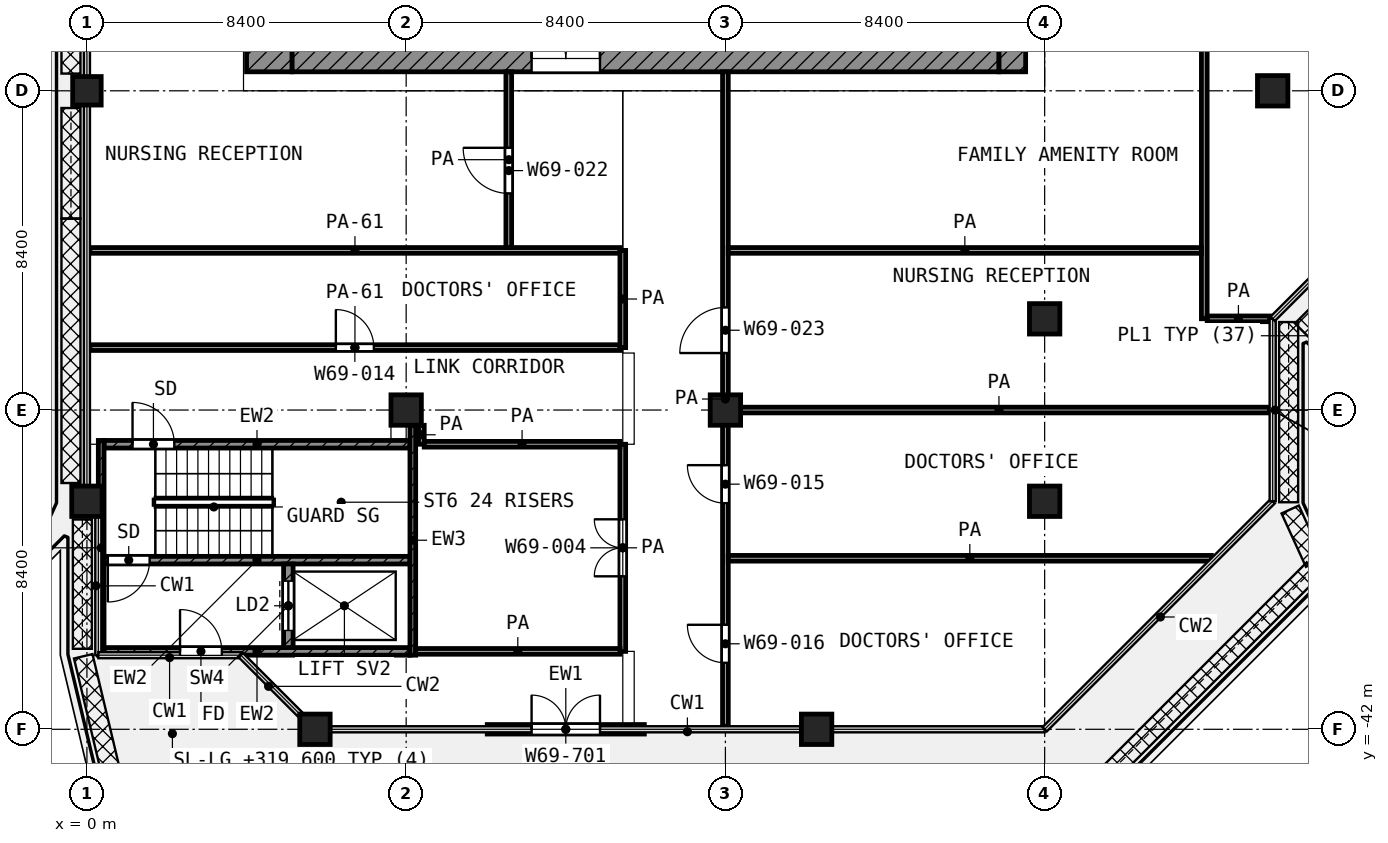
"""IFC4 building model, lengths in metres.
Left out: names, types, materials, properties, quantities, classifications, styles, units other than length and angle.
Written with IfcOpenShell. Run it as: python <this file> out.ifc"""

import sys

from ifc_helpers import new_model, si_unit, direction, frame, frame_2d, origin, origin_2d, place, context, subcontext, project, spatial, rectangle, extrude, element, fill, save


model = new_model("IFC4")
c1 = context("Model", 3, precision=1e-05, world=origin(), true_north=direction((0.0, 1.0)))
c2 = subcontext(c1, "Body", "Model", "MODEL_VIEW")
j1 = project(units=[si_unit("LENGTHUNIT", "METRE"), si_unit("PLANEANGLEUNIT", "RADIAN")], contexts=[c1])
p1 = place(None, origin())
s1 = spatial("IfcSite", under=j1, at=p1, CompositionType="ELEMENT")
p2 = place(p1, origin())
s2 = spatial("IfcBuilding", under=s1, at=p2, CompositionType="ELEMENT")
p3 = place(p2, frame((0.0, 0.0, 319.6)))
s3 = spatial("IfcBuildingStorey", under=s2, at=p3, CompositionType="ELEMENT", Elevation=319.6)
p4 = place(p3, frame((0.0, -25.2, 0.0), z_axis=(0.0, 0.0, 1.0), x_axis=(1.0, 0.0, 0.0)))
e1 = element("IfcColumn", 1, at=p4, inside=s3, PredefinedType="COLUMN", context=c2, shape_type="SweptSolid", body=[
    extrude(rectangle(XDim=0.75, YDim=0.75, at=origin_2d()), origin(), (0.0, 0.0, 1.0), 4.2),
])
for number, where, z_axis, x_axis in (
    (2, (31.2, -25.2, 0.0), (0.0, 0.0, 1.0), (1.0, 0.0, 0.0)),
    (3, (25.2, -31.2, 0.0), (0.0, 0.0, 1.0), (1.0, 0.0, 0.0)),
    (4, (8.4, -33.6, 0.0), (0.0, 0.0, 1.0), (1.0, 0.0, 0.0)),
    (5, (16.8, -33.6, 0.0), (0.0, 0.0, 1.0), (1.0, 0.0, 0.0)),
    (6, (0.0, -36.0, 0.0), (0.0, 0.0, 1.0), (1.0, 0.0, 0.0)),
    (7, (25.2, -36.0, 0.0), (0.0, 0.0, 1.0), (1.0, 0.0, 0.0)),
    (8, (6.0, -42.0, 0.0), (0.0, 0.0, 1.0), (1.0, 0.0, 0.0)),
    (9, (19.2, -42.0, 0.0), (0.0, 0.0, 1.0), (1.0, 0.0, 0.0)),
):
    element("IfcColumn", number, at=place(p3, frame(where, z_axis=z_axis, x_axis=x_axis)), inside=s3, PredefinedType="COLUMN", context=c2, shape_type="SweptSolid", body=[
        extrude(rectangle(XDim=0.8, YDim=0.8, at=origin_2d()), origin(), (0.0, 0.0, 1.0), 4.2),
    ])
p5 = place(p3, frame((10.533, -42.0, 0.0), z_axis=(0.0, 0.0, 1.0), x_axis=(1.0, 0.0, 0.0)))
e10 = element("IfcWall", 10, at=p5, inside=s3, PredefinedType="SOLIDWALL", context=c2, shape_type="SweptSolid", body=[
    extrude(rectangle(XDim=4.133, YDim=0.25, at=frame_2d((2.067, 0.0))), origin(), (0.0, 0.0, 1.0), 3.48),
])
p6 = place(p5, frame((1.167, 0.0, 0.0)))
e11 = element("IfcOpeningElement", 11, at=p6, cuts=e10, PredefinedType="OPENING", context=c2, shape_type="SweptSolid", body=[
    extrude(rectangle(XDim=1.8, YDim=2.1, at=frame_2d((0.9, 1.05))), frame((0.0, 0.135, 0.0), z_axis=(0.0, -1.0, 0.0), x_axis=(1.0, 0.0, 0.0)), (0.0, 0.0, 1.0), 0.27),
])
p7 = place(p3, frame((4.8, -24.7, 0.0), z_axis=(0.0, 0.0, 1.0), x_axis=(0.0, 1.0, 0.0)))
e12 = element("IfcWall", 12, at=p7, inside=s3, PredefinedType="SHEAR", context=c2, shape_type="SweptSolid", body=[
    extrude(rectangle(XDim=19.3, YDim=1.2, at=frame_2d((9.65, 0.0))), origin(), (0.0, 0.0, 1.0), 3.6),
])
p8 = place(p7, frame((11.15, 0.0, 0.0)))
e13 = element("IfcOpeningElement", 13, at=p8, cuts=e12, PredefinedType="OPENING", context=c2, shape_type="SweptSolid", body=[
    extrude(rectangle(XDim=1.1, YDim=2.1, at=frame_2d((0.55, 1.05))), frame((0.0, 0.61, 0.0), z_axis=(0.0, -1.0, 0.0), x_axis=(1.0, 0.0, 0.0)), (0.0, 0.0, 1.0), 1.22),
])
p9 = place(p7, frame((1.85, 0.0, 0.0)))
e14 = element("IfcOpeningElement", 14, at=p9, cuts=e12, PredefinedType="OPENING", context=c2, shape_type="SweptSolid", body=[
    extrude(rectangle(XDim=1.1, YDim=2.1, at=frame_2d((0.55, 1.05))), frame((0.0, 0.61, 0.0), z_axis=(0.0, -1.0, 0.0), x_axis=(1.0, 0.0, 0.0)), (0.0, 0.0, 1.0), 1.22),
])
p10 = place(p3, frame((5.4, -24.35, 0.0), z_axis=(0.0, 0.0, 1.0), x_axis=(1.0, 0.0, 0.0)))
e15 = element("IfcWall", 15, at=p10, inside=s3, PredefinedType="SHEAR", context=c2, shape_type="SweptSolid", body=[
    extrude(rectangle(XDim=18.6, YDim=0.7, at=frame_2d((9.3, 0.0))), origin(), (0.0, 0.0, 1.0), 3.6),
])
p11 = place(p10, frame((6.3, 0.0, 0.0)))
e16 = element("IfcOpeningElement", 16, at=p11, cuts=e15, PredefinedType="OPENING", context=c2, shape_type="SweptSolid", body=[
    extrude(rectangle(XDim=1.8, YDim=2.1, at=frame_2d((0.9, 1.05))), frame((0.0, 0.36, 0.0), z_axis=(0.0, -1.0, 0.0), x_axis=(1.0, 0.0, 0.0)), (0.0, 0.0, 1.0), 0.72),
])
p12 = place(p3, frame((24.35, -24.7, 0.0), z_axis=(0.0, 0.0, 1.0), x_axis=(0.0, 1.0, 0.0)))
e17 = element("IfcWall", 17, at=p12, inside=s3, PredefinedType="SHEAR", context=c2, shape_type="SweptSolid", body=[
    extrude(rectangle(XDim=0.7, YDim=0.7, at=frame_2d((0.35, 0.0))), origin(), (0.0, 0.0, 1.0), 3.6),
])
p13 = place(p3, frame((0.375, -40.05, 0.0), z_axis=(0.0, 0.0, 1.0), x_axis=(0.0, 1.0, 0.0)))
e18 = element("IfcWall", 18, at=p13, inside=s3, PredefinedType="SHEAR", context=c2, shape_type="SweptSolid", body=[
    extrude(rectangle(XDim=5.65, YDim=0.15, at=frame_2d((2.825, 0.0))), origin(), (0.0, 0.0, 1.0), 3.6),
])
p14 = place(p3, frame((8.575, -40.05, 0.0), z_axis=(0.0, 0.0, 1.0), x_axis=(0.0, 1.0, 0.0)))
e19 = element("IfcWall", 19, at=p14, inside=s3, PredefinedType="SHEAR", context=c2, shape_type="SweptSolid", body=[
    extrude(rectangle(XDim=6.05, YDim=0.15, at=frame_2d((3.025, 0.0))), origin(), (0.0, 0.0, 1.0), 3.6),
])
p15 = place(p3, frame((0.45, -34.5, 0.0), z_axis=(0.0, 0.0, 1.0), x_axis=(1.0, 0.0, 0.0)))
e20 = element("IfcWall", 20, at=p15, inside=s3, PredefinedType="SHEAR", context=c2, shape_type="SweptSolid", body=[
    extrude(rectangle(XDim=8.05, YDim=0.2, at=frame_2d((4.025, 0.0))), origin(), (0.0, 0.0, 1.0), 3.6),
])
p16 = place(p15, frame((0.75, 0.0, 0.0)))
e21 = element("IfcOpeningElement", 21, at=p16, cuts=e20, PredefinedType="OPENING", context=c2, shape_type="SweptSolid", body=[
    extrude(rectangle(XDim=1.1, YDim=2.1, at=frame_2d((0.55, 1.05))), frame((0.0, 0.11, 0.0), z_axis=(0.0, -1.0, 0.0), x_axis=(1.0, 0.0, 0.0)), (0.0, 0.0, 1.0), 0.22),
])
p17 = place(p3, frame((0.45, -37.55, 0.0), z_axis=(0.0, 0.0, 1.0), x_axis=(1.0, 0.0, 0.0)))
e22 = element("IfcWall", 22, at=p17, inside=s3, PredefinedType="SHEAR", context=c2, shape_type="SweptSolid", body=[
    extrude(rectangle(XDim=8.05, YDim=0.2, at=frame_2d((4.025, 0.0))), origin(), (0.0, 0.0, 1.0), 3.6),
])
p18 = place(p17, frame((0.1, 0.0, 0.0)))
e23 = element("IfcOpeningElement", 23, at=p18, cuts=e22, PredefinedType="OPENING", context=c2, shape_type="SweptSolid", body=[
    extrude(rectangle(XDim=1.1, YDim=2.1, at=frame_2d((0.55, 1.05))), frame((0.0, 0.11, 0.0), z_axis=(0.0, -1.0, 0.0), x_axis=(1.0, 0.0, 0.0)), (0.0, 0.0, 1.0), 0.22),
])
p19 = place(p3, frame((0.45, -39.95, 0.0), z_axis=(0.0, 0.0, 1.0), x_axis=(1.0, 0.0, 0.0)))
e24 = element("IfcWall", 24, at=p19, inside=s3, PredefinedType="SHEAR", context=c2, shape_type="SweptSolid", body=[
    extrude(rectangle(XDim=8.05, YDim=0.2, at=frame_2d((4.025, 0.0))), origin(), (0.0, 0.0, 1.0), 3.6),
])
p20 = place(p19, frame((2.0, 0.0, 0.0)))
e25 = element("IfcOpeningElement", 25, at=p20, cuts=e24, PredefinedType="OPENING", context=c2, shape_type="SweptSolid", body=[
    extrude(rectangle(XDim=1.1, YDim=2.1, at=frame_2d((0.55, 1.05))), frame((0.0, 0.11, 0.0), z_axis=(0.0, -1.0, 0.0), x_axis=(1.0, 0.0, 0.0)), (0.0, 0.0, 1.0), 0.22),
])
p21 = place(p3, frame((5.3, -39.85, 0.0), z_axis=(0.0, 0.0, 1.0), x_axis=(0.0, 1.0, 0.0)))
e26 = element("IfcWall", 26, at=p21, inside=s3, PredefinedType="SHEAR", context=c2, shape_type="SweptSolid", body=[
    extrude(rectangle(XDim=2.2, YDim=0.25, at=frame_2d((1.1, 0.0))), origin(), (0.0, 0.0, 1.0), 3.6),
])
p22 = place(p21, frame((0.45, 0.0, 0.0)))
e27 = element("IfcOpeningElement", 27, at=p22, cuts=e26, PredefinedType="OPENING", context=c2, shape_type="SweptSolid", body=[
    extrude(rectangle(XDim=1.3, YDim=2.1, at=frame_2d((0.65, 1.05))), frame((0.0, 0.135, 0.0), z_axis=(0.0, -1.0, 0.0), x_axis=(1.0, 0.0, 0.0)), (0.0, 0.0, 1.0), 0.27),
])
p23 = place(p3, frame((8.65, -39.95, 0.0), z_axis=(0.0, 0.0, 1.0), x_axis=(1.0, 0.0, 0.0)))
e28 = element("IfcWall", 28, at=p23, inside=s3, PredefinedType="PARTITIONING", context=c2, shape_type="SweptSolid", body=[
    extrude(rectangle(XDim=5.375, YDim=0.15, at=frame_2d((2.688, 0.0))), origin(), (0.0, 0.0, 1.0), 3.6),
])
p24 = place(p3, frame((16.875, -37.5, 0.0), z_axis=(0.0, 0.0, 1.0), x_axis=(1.0, 0.0, 0.0)))
e29 = element("IfcWall", 29, at=p24, inside=s3, PredefinedType="PARTITIONING", context=c2, shape_type="SweptSolid", body=[
    extrude(rectangle(XDim=12.712, YDim=0.15, at=frame_2d((6.356, 0.0))), origin(), (0.0, 0.0, 1.0), 3.6),
])
p25 = place(p3, frame((8.875, -34.5, 0.0), z_axis=(0.0, 0.0, 1.0), x_axis=(1.0, 0.0, 0.0)))
e30 = element("IfcWall", 30, at=p25, inside=s3, PredefinedType="PARTITIONING", context=c2, shape_type="SweptSolid", body=[
    extrude(rectangle(XDim=5.15, YDim=0.15, at=frame_2d((2.575, 0.0))), origin(), (0.0, 0.0, 1.0), 3.6),
])
p26 = place(p3, frame((16.875, -33.6, 0.0), z_axis=(0.0, 0.0, 1.0), x_axis=(1.0, 0.0, 0.0)))
e31 = element("IfcWall", 31, at=p26, inside=s3, PredefinedType="PARTITIONING", context=c2, shape_type="SweptSolid", body=[
    extrude(rectangle(XDim=14.245, YDim=0.15, at=frame_2d((7.123, 0.0))), origin(), (0.0, 0.0, 1.0), 3.6),
])
p27 = place(p3, frame((0.08, -31.957, 0.0), z_axis=(0.0, 0.0, 1.0), x_axis=(1.0, 0.0, 0.0)))
e32 = element("IfcWall", 32, at=p27, inside=s3, PredefinedType="PARTITIONING", context=c2, shape_type="SweptSolid", body=[
    extrude(rectangle(XDim=13.945, YDim=0.15, at=frame_2d((6.972, 0.0))), origin(), (0.0, 0.0, 1.0), 2.7),
])
p28 = place(p27, frame((6.47, 0.0, 0.0)))
e33 = element("IfcOpeningElement", 33, at=p28, cuts=e32, PredefinedType="OPENING", context=c2, shape_type="SweptSolid", body=[
    extrude(rectangle(XDim=1.0, YDim=2.1, at=frame_2d((0.5, 1.05))), frame((0.0, 0.085, 0.0), z_axis=(0.0, -1.0, 0.0), x_axis=(1.0, 0.0, 0.0)), (0.0, 0.0, 1.0), 0.17),
])
p29 = place(p3, frame((29.477, -31.2, 0.0), z_axis=(0.0, 0.0, 1.0), x_axis=(1.0, 0.0, 0.0)))
e34 = element("IfcWall", 34, at=p29, inside=s3, PredefinedType="PARTITIONING", context=c2, shape_type="SweptSolid", body=[
    extrude(rectangle(XDim=1.643, YDim=0.15, at=frame_2d((0.822, 0.0))), origin(), (0.0, 0.0, 1.0), 3.6),
])
p30 = place(p3, frame((0.08, -29.4, 0.0), z_axis=(0.0, 0.0, 1.0), x_axis=(1.0, 0.0, 0.0)))
e35 = element("IfcWall", 35, at=p30, inside=s3, PredefinedType="PARTITIONING", context=c2, shape_type="SweptSolid", body=[
    extrude(rectangle(XDim=13.945, YDim=0.15, at=frame_2d((6.972, 0.0))), origin(), (0.0, 0.0, 1.0), 2.7),
])
p31 = place(p3, frame((16.875, -29.4, 0.0), z_axis=(0.0, 0.0, 1.0), x_axis=(1.0, 0.0, 0.0)))
e36 = element("IfcWall", 36, at=p31, inside=s3, PredefinedType="PARTITIONING", context=c2, shape_type="SweptSolid", body=[
    extrude(rectangle(XDim=12.45, YDim=0.15, at=frame_2d((6.225, 0.0))), origin(), (0.0, 0.0, 1.0), 3.6),
])
p32 = place(p3, frame((8.8, -34.5, 0.0), z_axis=(0.0, 0.0, 1.0), x_axis=(0.0, 1.0, 0.0)))
e37 = element("IfcWall", 37, at=p32, inside=s3, PredefinedType="PARTITIONING", context=c2, shape_type="SweptSolid", body=[
    extrude(rectangle(XDim=0.499, YDim=0.15, at=frame_2d((0.25, 0.0))), origin(), (0.0, 0.0, 1.0), 3.6),
])
p33 = place(p3, frame((11.1, -29.325, 0.0), z_axis=(0.0, 0.0, 1.0), x_axis=(0.0, 1.0, 0.0)))
e38 = element("IfcWall", 38, at=p33, inside=s3, PredefinedType="PARTITIONING", context=c2, shape_type="SweptSolid", body=[
    extrude(rectangle(XDim=4.625, YDim=0.15, at=frame_2d((2.312, 0.0))), origin(), (0.0, 0.0, 1.0), 3.6),
])
p34 = place(p33, frame((1.425, 0.0, 0.0)))
e39 = element("IfcOpeningElement", 39, at=p34, cuts=e38, PredefinedType="OPENING", context=c2, shape_type="SweptSolid", body=[
    extrude(rectangle(XDim=1.2, YDim=2.1, at=frame_2d((0.6, 1.05))), frame((0.0, 0.085, 0.0), z_axis=(0.0, -1.0, 0.0), x_axis=(1.0, 0.0, 0.0)), (0.0, 0.0, 1.0), 0.17),
])
p35 = place(p3, frame((14.1, -39.95, 0.0), z_axis=(0.0, 0.0, 1.0), x_axis=(0.0, 1.0, 0.0)))
e40 = element("IfcWall", 40, at=p35, inside=s3, PredefinedType="PARTITIONING", context=c2, shape_type="SweptSolid", body=[
    extrude(rectangle(XDim=5.45, YDim=0.15, at=frame_2d((2.725, 0.0))), origin(), (0.0, 0.0, 1.0), 3.6),
])
p36 = place(p35, frame((1.975, 0.0, 0.0)))
e41 = element("IfcOpeningElement", 41, at=p36, cuts=e40, PredefinedType="OPENING", context=c2, shape_type="SweptSolid", body=[
    extrude(rectangle(XDim=1.5, YDim=2.1, at=frame_2d((0.75, 1.05))), frame((0.0, 0.085, 0.0), z_axis=(0.0, -1.0, 0.0), x_axis=(1.0, 0.0, 0.0)), (0.0, 0.0, 1.0), 0.17),
])
p37 = place(p3, frame((14.1, -31.957, 0.0), z_axis=(0.0, 0.0, 1.0), x_axis=(0.0, 1.0, 0.0)))
e42 = element("IfcWall", 42, at=p37, inside=s3, PredefinedType="PARTITIONING", context=c2, shape_type="SweptSolid", body=[
    extrude(rectangle(XDim=2.557, YDim=0.15, at=frame_2d((1.279, 0.0))), origin(), (0.0, 0.0, 1.0), 3.6),
])
p38 = place(p3, frame((16.8, -41.92, 0.0), z_axis=(0.0, 0.0, 1.0), x_axis=(0.0, 1.0, 0.0)))
e43 = element("IfcWall", 43, at=p38, inside=s3, PredefinedType="PARTITIONING", context=c2, shape_type="SweptSolid", body=[
    extrude(rectangle(XDim=17.22, YDim=0.15, at=frame_2d((8.61, 0.0))), origin(), (0.0, 0.0, 1.0), 3.6),
])
p39 = place(p38, frame((9.82, 0.0, 0.0)))
e44 = element("IfcOpeningElement", 44, at=p39, cuts=e43, PredefinedType="OPENING", context=c2, shape_type="SweptSolid", body=[
    extrude(rectangle(XDim=1.2, YDim=2.1, at=frame_2d((0.6, 1.05))), frame((0.0, 0.085, 0.0), z_axis=(0.0, -1.0, 0.0), x_axis=(1.0, 0.0, 0.0)), (0.0, 0.0, 1.0), 0.17),
])
p40 = place(p38, frame((5.87, 0.0, 0.0)))
e45 = element("IfcOpeningElement", 45, at=p40, cuts=e43, PredefinedType="OPENING", context=c2, shape_type="SweptSolid", body=[
    extrude(rectangle(XDim=1.0, YDim=2.1, at=frame_2d((0.5, 1.05))), frame((0.0, 0.085, 0.0), z_axis=(0.0, -1.0, 0.0), x_axis=(1.0, 0.0, 0.0)), (0.0, 0.0, 1.0), 0.17),
])
p41 = place(p38, frame((1.67, 0.0, 0.0)))
e46 = element("IfcOpeningElement", 46, at=p41, cuts=e43, PredefinedType="OPENING", context=c2, shape_type="SweptSolid", body=[
    extrude(rectangle(XDim=1.0, YDim=2.1, at=frame_2d((0.5, 1.05))), frame((0.0, 0.085, 0.0), z_axis=(0.0, -1.0, 0.0), x_axis=(1.0, 0.0, 0.0)), (0.0, 0.0, 1.0), 0.17),
])
p42 = place(p3, frame((29.4, -31.198, 0.0), z_axis=(0.0, 0.0, 1.0), x_axis=(0.0, 1.0, 0.0)))
e47 = element("IfcWall", 47, at=p42, inside=s3, PredefinedType="PARTITIONING", context=c2, shape_type="SweptSolid", body=[
    extrude(rectangle(XDim=14.323, YDim=0.15, at=frame_2d((7.162, 0.0))), origin(), (0.0, 0.0, 1.0), 3.6),
])
p43 = place(p6, origin())
e48 = element("IfcDoor", 48, at=p43, inside=s3, OperationType="DOUBLE_DOOR_SINGLE_SWING", PredefinedType="DOOR", context=c2, shape_type="SweptSolid", body=[
    extrude(rectangle(XDim=1.8, YDim=2.1, at=frame_2d((0.9, 1.05))), frame((0.0, 0.025, 0.0), z_axis=(0.0, -1.0, 0.0), x_axis=(1.0, 0.0, 0.0)), (0.0, 0.0, 1.0), 0.05),
])
fill(e11, e48)
p44 = place(p11, origin())
e49 = element("IfcDoor", 49, at=p44, inside=s3, OperationType="DOUBLE_DOOR_SINGLE_SWING", PredefinedType="DOOR", context=c2, shape_type="SweptSolid", body=[
    extrude(rectangle(XDim=1.8, YDim=2.1, at=frame_2d((0.9, 1.05))), frame((0.0, 0.025, 0.0), z_axis=(0.0, -1.0, 0.0), x_axis=(1.0, 0.0, 0.0)), (0.0, 0.0, 1.0), 0.05),
])
fill(e16, e49)
p45 = place(p16, origin())
e50 = element("IfcDoor", 50, at=p45, inside=s3, OperationType="SINGLE_SWING_LEFT", PredefinedType="DOOR", context=c2, shape_type="SweptSolid", body=[
    extrude(rectangle(XDim=1.1, YDim=2.1, at=frame_2d((0.55, 1.05))), frame((0.0, 0.025, 0.0), z_axis=(0.0, -1.0, 0.0), x_axis=(1.0, 0.0, 0.0)), (0.0, 0.0, 1.0), 0.05),
])
fill(e21, e50)
p46 = place(p18, frame((1.1, 0.0, 0.0), z_axis=(0.0, 0.0, 1.0), x_axis=(-1.0, 0.0, 0.0)))
e51 = element("IfcDoor", 51, at=p46, inside=s3, OperationType="SINGLE_SWING_LEFT", PredefinedType="DOOR", context=c2, shape_type="SweptSolid", body=[
    extrude(rectangle(XDim=1.1, YDim=2.1, at=frame_2d((0.55, 1.05))), frame((0.0, 0.025, 0.0), z_axis=(0.0, -1.0, 0.0), x_axis=(1.0, 0.0, 0.0)), (0.0, 0.0, 1.0), 0.05),
])
fill(e23, e51)
p47 = place(p22, origin())
e52 = element("IfcDoor", 52, at=p47, inside=s3, OperationType="DOUBLE_DOOR_SLIDING", PredefinedType="DOOR", context=c2, shape_type="SweptSolid", body=[
    extrude(rectangle(XDim=1.3, YDim=2.1, at=frame_2d((0.65, 1.05))), frame((0.0, 0.025, 0.0), z_axis=(0.0, -1.0, 0.0), x_axis=(1.0, 0.0, 0.0)), (0.0, 0.0, 1.0), 0.05),
])
fill(e27, e52)
p48 = place(p20, origin())
e53 = element("IfcDoor", 53, at=p48, inside=s3, OperationType="SINGLE_SWING_LEFT", PredefinedType="DOOR", context=c2, shape_type="SweptSolid", body=[
    extrude(rectangle(XDim=1.1, YDim=2.1, at=frame_2d((0.55, 1.05))), frame((0.0, 0.025, 0.0), z_axis=(0.0, -1.0, 0.0), x_axis=(1.0, 0.0, 0.0)), (0.0, 0.0, 1.0), 0.05),
])
fill(e25, e53)
p49 = place(p34, origin())
e54 = element("IfcDoor", 54, at=p49, inside=s3, OperationType="SINGLE_SWING_RIGHT", PredefinedType="DOOR", context=c2, shape_type="SweptSolid", body=[
    extrude(rectangle(XDim=1.2, YDim=2.1, at=frame_2d((0.6, 1.05))), frame((0.0, 0.025, 0.0), z_axis=(0.0, -1.0, 0.0), x_axis=(1.0, 0.0, 0.0)), (0.0, 0.0, 1.0), 0.05),
])
fill(e39, e54)
p50 = place(p28, origin())
e55 = element("IfcDoor", 55, at=p50, inside=s3, OperationType="SINGLE_SWING_LEFT", PredefinedType="DOOR", context=c2, shape_type="SweptSolid", body=[
    extrude(rectangle(XDim=1.0, YDim=2.1, at=frame_2d((0.5, 1.05))), frame((0.0, 0.025, 0.0), z_axis=(0.0, -1.0, 0.0), x_axis=(1.0, 0.0, 0.0)), (0.0, 0.0, 1.0), 0.05),
])
fill(e33, e55)
p51 = place(p36, origin())
e56 = element("IfcDoor", 56, at=p51, inside=s3, OperationType="DOUBLE_DOOR_SINGLE_SWING", PredefinedType="DOOR", context=c2, shape_type="SweptSolid", body=[
    extrude(rectangle(XDim=1.5, YDim=2.1, at=frame_2d((0.75, 1.05))), frame((0.0, 0.025, 0.0), z_axis=(0.0, -1.0, 0.0), x_axis=(1.0, 0.0, 0.0)), (0.0, 0.0, 1.0), 0.05),
])
fill(e41, e56)
p52 = place(p39, origin())
e57 = element("IfcDoor", 57, at=p52, inside=s3, OperationType="SINGLE_SWING_LEFT", PredefinedType="DOOR", context=c2, shape_type="SweptSolid", body=[
    extrude(rectangle(XDim=1.2, YDim=2.1, at=frame_2d((0.6, 1.05))), frame((0.0, 0.025, 0.0), z_axis=(0.0, -1.0, 0.0), x_axis=(1.0, 0.0, 0.0)), (0.0, 0.0, 1.0), 0.05),
])
fill(e44, e57)
p53 = place(p40, origin())
e58 = element("IfcDoor", 58, at=p53, inside=s3, OperationType="SINGLE_SWING_RIGHT", PredefinedType="DOOR", context=c2, shape_type="SweptSolid", body=[
    extrude(rectangle(XDim=1.0, YDim=2.1, at=frame_2d((0.5, 1.05))), frame((0.0, 0.025, 0.0), z_axis=(0.0, -1.0, 0.0), x_axis=(1.0, 0.0, 0.0)), (0.0, 0.0, 1.0), 0.05),
])
fill(e45, e58)
p54 = place(p41, origin())
e59 = element("IfcDoor", 59, at=p54, inside=s3, OperationType="SINGLE_SWING_RIGHT", PredefinedType="DOOR", context=c2, shape_type="SweptSolid", body=[
    extrude(rectangle(XDim=1.0, YDim=2.1, at=frame_2d((0.5, 1.05))), frame((0.0, 0.025, 0.0), z_axis=(0.0, -1.0, 0.0), x_axis=(1.0, 0.0, 0.0)), (0.0, 0.0, 1.0), 0.05),
])
fill(e46, e59)
save(model, sys.argv[1])
